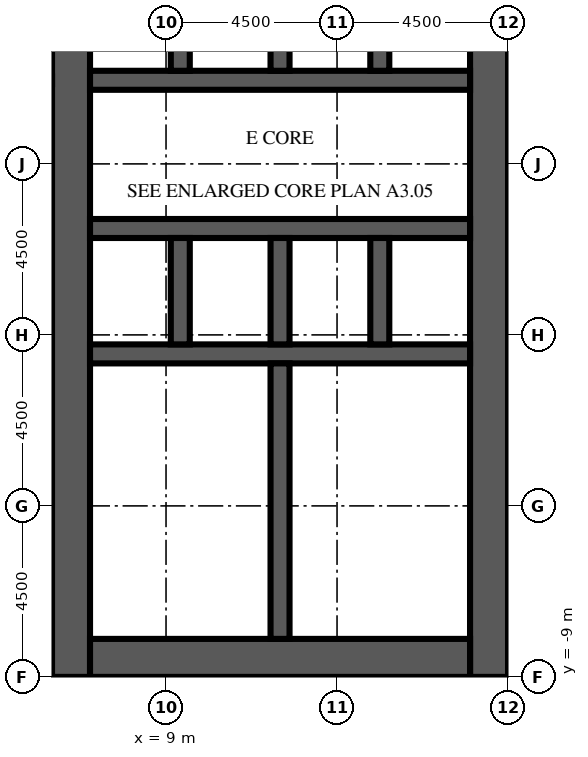
"""IFC4 building model, lengths in metres.
Left out: names, types, materials, properties, quantities, classifications, styles, units other than length and angle.
Written with IfcOpenShell. Run it as: python <this file> out.ifc"""

import sys

from ifc_helpers import new_model, si_unit, direction, frame, frame_2d, origin, place, context, subcontext, project, spatial, rectangle, extrude, element, fill, save


model = new_model("IFC4")
c1 = context("Model", 3, precision=1e-05, world=origin(), true_north=direction((0.0, 1.0)))
c2 = subcontext(c1, "Body", "Model", "MODEL_VIEW")
j1 = project(units=[si_unit("LENGTHUNIT", "METRE"), si_unit("PLANEANGLEUNIT", "RADIAN")], contexts=[c1])
p1 = place(None, origin())
s1 = spatial("IfcSite", under=j1, at=p1, CompositionType="ELEMENT")
p2 = place(p1, origin())
s2 = spatial("IfcBuilding", under=s1, at=p2, CompositionType="ELEMENT")
p3 = place(p2, frame((0.0, 0.0, 27.7)))
s3 = spatial("IfcBuildingStorey", under=s2, at=p3, CompositionType="ELEMENT", Elevation=27.7)
p4 = place(p3, frame((6.5, -9.0, 0.0), z_axis=(0.0, 0.0, 1.0), x_axis=(0.0, 1.0, 0.0)))
e1 = element("IfcWall", 1, at=p4, inside=s3, PredefinedType="SHEAR", context=c2, shape_type="SweptSolid", body=[
    extrude(rectangle(XDim=27.5, YDim=1.0, at=frame_2d((13.75, 0.0))), origin(), (0.0, 0.0, 1.0), 4.1),
])
p5 = place(p4, frame((12.55, 0.0, 0.0)))
e2 = element("IfcOpeningElement", 2, at=p5, cuts=e1, PredefinedType="OPENING", context=c2, shape_type="SweptSolid", body=[
    extrude(rectangle(XDim=2.4, YDim=2.4, at=frame_2d((1.2, 1.2))), frame((0.0, 0.51, 0.0), z_axis=(0.0, -1.0, 0.0), x_axis=(1.0, 0.0, 0.0)), (0.0, 0.0, 1.0), 1.02),
])
p6 = place(p4, frame((3.955, 0.0, 0.0)))
e3 = element("IfcOpeningElement", 3, at=p6, cuts=e1, PredefinedType="OPENING", context=c2, shape_type="SweptSolid", body=[
    extrude(rectangle(XDim=0.905, YDim=2.1, at=frame_2d((0.453, 1.05))), frame((0.0, 0.51, 0.0), z_axis=(0.0, -1.0, 0.0), x_axis=(1.0, 0.0, 0.0)), (0.0, 0.0, 1.0), 1.02),
])
p7 = place(p4, frame((23.363, 0.0, 0.0)))
e4 = element("IfcOpeningElement", 4, at=p7, cuts=e1, PredefinedType="OPENING", context=c2, shape_type="SweptSolid", body=[
    extrude(rectangle(XDim=1.2, YDim=2.1, at=frame_2d((0.6, 1.05))), frame((0.0, 0.51, 0.0), z_axis=(0.0, -1.0, 0.0), x_axis=(1.0, 0.0, 0.0)), (0.0, 0.0, 1.0), 1.02),
])
p8 = place(p3, frame((17.5, -9.0, 0.0), z_axis=(0.0, 0.0, 1.0), x_axis=(0.0, 1.0, 0.0)))
e5 = element("IfcWall", 5, at=p8, inside=s3, PredefinedType="SHEAR", context=c2, shape_type="SweptSolid", body=[
    extrude(rectangle(XDim=27.5, YDim=1.0, at=frame_2d((13.75, 0.0))), origin(), (0.0, 0.0, 1.0), 4.1),
])
p9 = place(p8, frame((12.55, 0.0, 0.0)))
e6 = element("IfcOpeningElement", 6, at=p9, cuts=e5, PredefinedType="OPENING", context=c2, shape_type="SweptSolid", body=[
    extrude(rectangle(XDim=2.4, YDim=2.4, at=frame_2d((1.2, 1.2))), frame((0.0, 0.51, 0.0), z_axis=(0.0, -1.0, 0.0), x_axis=(1.0, 0.0, 0.0)), (0.0, 0.0, 1.0), 1.02),
])
p10 = place(p8, frame((6.825, 0.0, 0.0)))
e7 = element("IfcOpeningElement", 7, at=p10, cuts=e5, PredefinedType="OPENING", context=c2, shape_type="SweptSolid", body=[
    extrude(rectangle(XDim=1.2, YDim=2.1, at=frame_2d((0.6, 1.05))), frame((0.0, 0.51, 0.0), z_axis=(0.0, -1.0, 0.0), x_axis=(1.0, 0.0, 0.0)), (0.0, 0.0, 1.0), 1.02),
])
p11 = place(p8, frame((19.475, 0.0, 0.0)))
e8 = element("IfcOpeningElement", 8, at=p11, cuts=e5, PredefinedType="OPENING", context=c2, shape_type="SweptSolid", body=[
    extrude(rectangle(XDim=1.2, YDim=2.1, at=frame_2d((0.6, 1.05))), frame((0.0, 0.51, 0.0), z_axis=(0.0, -1.0, 0.0), x_axis=(1.0, 0.0, 0.0)), (0.0, 0.0, 1.0), 1.02),
])
p12 = place(p3, frame((7.0, -8.5, 0.0), z_axis=(0.0, 0.0, 1.0), x_axis=(1.0, 0.0, 0.0)))
e9 = element("IfcWall", 9, at=p12, inside=s3, PredefinedType="SHEAR", context=c2, shape_type="SweptSolid", body=[
    extrude(rectangle(XDim=10.0, YDim=1.0, at=frame_2d((5.0, 0.0))), origin(), (0.0, 0.0, 1.0), 4.1),
])
p13 = place(p3, frame((7.0, -0.5, 0.0), z_axis=(0.0, 0.0, 1.0), x_axis=(1.0, 0.0, 0.0)))
e10 = element("IfcWall", 10, at=p13, inside=s3, PredefinedType="SHEAR", context=c2, shape_type="SweptSolid", body=[
    extrude(rectangle(XDim=10.0, YDim=0.5, at=frame_2d((5.0, 0.0))), origin(), (0.0, 0.0, 1.0), 4.1),
])
p14 = place(p3, frame((7.0, 2.8, 0.0), z_axis=(0.0, 0.0, 1.0), x_axis=(1.0, 0.0, 0.0)))
e11 = element("IfcWall", 11, at=p14, inside=s3, PredefinedType="SHEAR", context=c2, shape_type="SweptSolid", body=[
    extrude(rectangle(XDim=10.0, YDim=0.5, at=frame_2d((5.0, 0.0))), origin(), (0.0, 0.0, 1.0), 4.1),
])
p15 = place(p14, frame((0.512, 0.0, 0.0)))
e12 = element("IfcOpeningElement", 12, at=p15, cuts=e11, PredefinedType="OPENING", context=c2, shape_type="SweptSolid", body=[
    extrude(rectangle(XDim=1.1, YDim=2.1, at=frame_2d((0.55, 1.05))), frame((0.0, 0.26, 0.0), z_axis=(0.0, -1.0, 0.0), x_axis=(1.0, 0.0, 0.0)), (0.0, 0.0, 1.0), 0.52),
])
p16 = place(p14, frame((3.137, 0.0, 0.0)))
e13 = element("IfcOpeningElement", 13, at=p16, cuts=e11, PredefinedType="OPENING", context=c2, shape_type="SweptSolid", body=[
    extrude(rectangle(XDim=1.1, YDim=2.1, at=frame_2d((0.55, 1.05))), frame((0.0, 0.26, 0.0), z_axis=(0.0, -1.0, 0.0), x_axis=(1.0, 0.0, 0.0)), (0.0, 0.0, 1.0), 0.52),
])
p17 = place(p14, frame((8.387, 0.0, 0.0)))
e14 = element("IfcOpeningElement", 14, at=p17, cuts=e11, PredefinedType="OPENING", context=c2, shape_type="SweptSolid", body=[
    extrude(rectangle(XDim=1.1, YDim=2.1, at=frame_2d((0.55, 1.05))), frame((0.0, 0.26, 0.0), z_axis=(0.0, -1.0, 0.0), x_axis=(1.0, 0.0, 0.0)), (0.0, 0.0, 1.0), 0.52),
])
p18 = place(p3, frame((7.0, 6.7, 0.0), z_axis=(0.0, 0.0, 1.0), x_axis=(1.0, 0.0, 0.0)))
e15 = element("IfcWall", 15, at=p18, inside=s3, PredefinedType="SHEAR", context=c2, shape_type="SweptSolid", body=[
    extrude(rectangle(XDim=10.0, YDim=0.5, at=frame_2d((5.0, 0.0))), origin(), (0.0, 0.0, 1.0), 4.1),
])
p19 = place(p18, frame((0.512, 0.0, 0.0)))
e16 = element("IfcOpeningElement", 16, at=p19, cuts=e15, PredefinedType="OPENING", context=c2, shape_type="SweptSolid", body=[
    extrude(rectangle(XDim=1.1, YDim=2.1, at=frame_2d((0.55, 1.05))), frame((0.0, 0.26, 0.0), z_axis=(0.0, -1.0, 0.0), x_axis=(1.0, 0.0, 0.0)), (0.0, 0.0, 1.0), 0.52),
])
p20 = place(p18, frame((3.188, 0.0, 0.0)))
e17 = element("IfcOpeningElement", 17, at=p20, cuts=e15, PredefinedType="OPENING", context=c2, shape_type="SweptSolid", body=[
    extrude(rectangle(XDim=1.0, YDim=2.1, at=frame_2d((0.5, 1.05))), frame((0.0, 0.26, 0.0), z_axis=(0.0, -1.0, 0.0), x_axis=(1.0, 0.0, 0.0)), (0.0, 0.0, 1.0), 0.52),
])
p21 = place(p18, frame((5.812, 0.0, 0.0)))
e18 = element("IfcOpeningElement", 18, at=p21, cuts=e15, PredefinedType="OPENING", context=c2, shape_type="SweptSolid", body=[
    extrude(rectangle(XDim=1.0, YDim=2.1, at=frame_2d((0.5, 1.05))), frame((0.0, 0.26, 0.0), z_axis=(0.0, -1.0, 0.0), x_axis=(1.0, 0.0, 0.0)), (0.0, 0.0, 1.0), 0.52),
])
p22 = place(p18, frame((8.438, 0.0, 0.0)))
e19 = element("IfcOpeningElement", 19, at=p22, cuts=e15, PredefinedType="OPENING", context=c2, shape_type="SweptSolid", body=[
    extrude(rectangle(XDim=1.0, YDim=2.1, at=frame_2d((0.5, 1.05))), frame((0.0, 0.26, 0.0), z_axis=(0.0, -1.0, 0.0), x_axis=(1.0, 0.0, 0.0)), (0.0, 0.0, 1.0), 0.52),
])
for number, where, z_axis, x_axis in (
    (20, (9.375, -0.25, 0.0), (0.0, 0.0, 1.0), (0.0, 1.0, 0.0)),
    (21, (9.375, 6.95, 0.0), (0.0, 0.0, 1.0), (0.0, 1.0, 0.0)),
    (22, (12.0, -0.25, 0.0), (0.0, 0.0, 1.0), (0.0, 1.0, 0.0)),
    (23, (12.0, 6.95, 0.0), (0.0, 0.0, 1.0), (0.0, 1.0, 0.0)),
    (24, (14.625, -0.25, 0.0), (0.0, 0.0, 1.0), (0.0, 1.0, 0.0)),
    (25, (14.625, 6.95, 0.0), (0.0, 0.0, 1.0), (0.0, 1.0, 0.0)),
):
    element("IfcWall", number, at=place(p3, frame(where, z_axis=z_axis, x_axis=x_axis)), inside=s3, PredefinedType="SHEAR", context=c2, shape_type="SweptSolid", body=[
        extrude(rectangle(XDim=2.8, YDim=0.5, at=frame_2d((1.4, 0.0))), origin(), (0.0, 0.0, 1.0), 4.1),
    ])
p23 = place(p3, frame((12.0, -8.0, 0.0), z_axis=(0.0, 0.0, 1.0), x_axis=(0.0, 1.0, 0.0)))
e26 = element("IfcWall", 26, at=p23, inside=s3, PredefinedType="SHEAR", context=c2, shape_type="SweptSolid", body=[
    extrude(rectangle(XDim=7.25, YDim=0.5, at=frame_2d((3.625, 0.0))), origin(), (0.0, 0.0, 1.0), 4.1),
])
p24 = place(p3, frame((7.0, -5.245, 0.0), z_axis=(0.0, 0.0, 1.0), x_axis=(1.0, 0.0, 0.0)))
e27 = element("IfcWall", 27, at=p24, inside=s3, PredefinedType="PARTITIONING", context=c2, shape_type="SweptSolid", body=[
    extrude(rectangle(XDim=4.75, YDim=0.1, at=frame_2d((2.375, 0.0))), origin(), (0.0, 0.0, 1.0), 3.65),
])
p25 = place(p24, frame((1.875, 0.0, 0.0)))
e28 = element("IfcOpeningElement", 28, at=p25, cuts=e27, PredefinedType="OPENING", context=c2, shape_type="SweptSolid", body=[
    extrude(rectangle(XDim=1.0, YDim=2.1, at=frame_2d((0.5, 1.05))), frame((0.0, 0.06, 0.0), z_axis=(0.0, -1.0, 0.0), x_axis=(1.0, 0.0, 0.0)), (0.0, 0.0, 1.0), 0.12),
])
p26 = place(p3, frame((7.0, -3.94, 0.0), z_axis=(0.0, 0.0, 1.0), x_axis=(1.0, 0.0, 0.0)))
e29 = element("IfcWall", 29, at=p26, inside=s3, PredefinedType="PARTITIONING", context=c2, shape_type="SweptSolid", body=[
    extrude(rectangle(XDim=2.945, YDim=0.1, at=frame_2d((1.473, 0.0))), origin(), (0.0, 0.0, 1.0), 3.65),
])
p27 = place(p26, frame((0.972, 0.0, 0.0)))
e30 = element("IfcOpeningElement", 30, at=p27, cuts=e29, PredefinedType="OPENING", context=c2, shape_type="SweptSolid", body=[
    extrude(rectangle(XDim=1.0, YDim=2.1, at=frame_2d((0.5, 1.05))), frame((0.0, 0.06, 0.0), z_axis=(0.0, -1.0, 0.0), x_axis=(1.0, 0.0, 0.0)), (0.0, 0.0, 1.0), 0.12),
])
p28 = place(p3, frame((9.945, -3.94, 0.0), z_axis=(0.0, 0.0, 1.0), x_axis=(1.0, 0.0, 0.0)))
e31 = element("IfcWall", 31, at=p28, inside=s3, PredefinedType="PARTITIONING", context=c2, shape_type="SweptSolid", body=[
    extrude(rectangle(XDim=1.805, YDim=0.1, at=frame_2d((0.902, 0.0))), origin(), (0.0, 0.0, 1.0), 3.65),
])
p29 = place(p28, frame((0.403, 0.0, 0.0)))
e32 = element("IfcOpeningElement", 32, at=p29, cuts=e31, PredefinedType="OPENING", context=c2, shape_type="SweptSolid", body=[
    extrude(rectangle(XDim=1.0, YDim=2.1, at=frame_2d((0.5, 1.05))), frame((0.0, 0.06, 0.0), z_axis=(0.0, -1.0, 0.0), x_axis=(1.0, 0.0, 0.0)), (0.0, 0.0, 1.0), 0.12),
])
p30 = place(p3, frame((9.945, -3.94, 0.0), z_axis=(0.0, 0.0, 1.0), x_axis=(0.0, 1.0, 0.0)))
e33 = element("IfcWall", 33, at=p30, inside=s3, PredefinedType="PARTITIONING", context=c2, shape_type="SweptSolid", body=[
    extrude(rectangle(XDim=3.19, YDim=0.1, at=frame_2d((1.595, 0.0))), origin(), (0.0, 0.0, 1.0), 3.65),
])
p31 = place(p15, origin())
e34 = element("IfcDoor", 34, at=p31, inside=s3, OperationType="DOUBLE_DOOR_SLIDING", PredefinedType="DOOR", context=c2, shape_type="SweptSolid", body=[
    extrude(rectangle(XDim=1.1, YDim=2.1, at=frame_2d((0.55, 1.05))), frame((0.0, 0.025, 0.0), z_axis=(0.0, -1.0, 0.0), x_axis=(1.0, 0.0, 0.0)), (0.0, 0.0, 1.0), 0.05),
])
fill(e12, e34)
p32 = place(p16, origin())
e35 = element("IfcDoor", 35, at=p32, inside=s3, OperationType="DOUBLE_DOOR_SLIDING", PredefinedType="DOOR", context=c2, shape_type="SweptSolid", body=[
    extrude(rectangle(XDim=1.1, YDim=2.1, at=frame_2d((0.55, 1.05))), frame((0.0, 0.025, 0.0), z_axis=(0.0, -1.0, 0.0), x_axis=(1.0, 0.0, 0.0)), (0.0, 0.0, 1.0), 0.05),
])
fill(e13, e35)
p33 = place(p17, origin())
e36 = element("IfcDoor", 36, at=p33, inside=s3, OperationType="DOUBLE_DOOR_SLIDING", PredefinedType="DOOR", context=c2, shape_type="SweptSolid", body=[
    extrude(rectangle(XDim=1.1, YDim=2.1, at=frame_2d((0.55, 1.05))), frame((0.0, 0.025, 0.0), z_axis=(0.0, -1.0, 0.0), x_axis=(1.0, 0.0, 0.0)), (0.0, 0.0, 1.0), 0.05),
])
fill(e14, e36)
p34 = place(p19, origin())
e37 = element("IfcDoor", 37, at=p34, inside=s3, OperationType="DOUBLE_DOOR_SLIDING", PredefinedType="DOOR", context=c2, shape_type="SweptSolid", body=[
    extrude(rectangle(XDim=1.1, YDim=2.1, at=frame_2d((0.55, 1.05))), frame((0.0, 0.025, 0.0), z_axis=(0.0, -1.0, 0.0), x_axis=(1.0, 0.0, 0.0)), (0.0, 0.0, 1.0), 0.05),
])
fill(e16, e37)
p35 = place(p5, origin())
e38 = element("IfcDoor", 38, at=p35, inside=s3, OperationType="DOUBLE_DOOR_DOUBLE_SWING", PredefinedType="DOOR", context=c2, shape_type="SweptSolid", body=[
    extrude(rectangle(XDim=2.4, YDim=2.4, at=frame_2d((1.2, 1.2))), frame((0.0, 0.025, 0.0), z_axis=(0.0, -1.0, 0.0), x_axis=(1.0, 0.0, 0.0)), (0.0, 0.0, 1.0), 0.05),
])
fill(e2, e38)
p36 = place(p9, origin())
e39 = element("IfcDoor", 39, at=p36, inside=s3, OperationType="DOUBLE_DOOR_DOUBLE_SWING", PredefinedType="DOOR", context=c2, shape_type="SweptSolid", body=[
    extrude(rectangle(XDim=2.4, YDim=2.4, at=frame_2d((1.2, 1.2))), frame((0.0, 0.025, 0.0), z_axis=(0.0, -1.0, 0.0), x_axis=(1.0, 0.0, 0.0)), (0.0, 0.0, 1.0), 0.05),
])
fill(e6, e39)
p37 = place(p10, frame((1.2, 0.0, 0.0), z_axis=(0.0, 0.0, 1.0), x_axis=(-1.0, 0.0, 0.0)))
e40 = element("IfcDoor", 40, at=p37, inside=s3, OperationType="SINGLE_SWING_LEFT", PredefinedType="DOOR", context=c2, shape_type="SweptSolid", body=[
    extrude(rectangle(XDim=1.2, YDim=2.1, at=frame_2d((0.6, 1.05))), frame((0.0, 0.025, 0.0), z_axis=(0.0, -1.0, 0.0), x_axis=(1.0, 0.0, 0.0)), (0.0, 0.0, 1.0), 0.05),
])
fill(e7, e40)
p38 = place(p20, origin())
e41 = element("IfcDoor", 41, at=p38, inside=s3, OperationType="SINGLE_SWING_RIGHT", PredefinedType="DOOR", context=c2, shape_type="SweptSolid", body=[
    extrude(rectangle(XDim=1.0, YDim=2.1, at=frame_2d((0.5, 1.05))), frame((0.0, 0.025, 0.0), z_axis=(0.0, -1.0, 0.0), x_axis=(1.0, 0.0, 0.0)), (0.0, 0.0, 1.0), 0.05),
])
fill(e17, e41)
p39 = place(p21, origin())
e42 = element("IfcDoor", 42, at=p39, inside=s3, OperationType="SINGLE_SWING_LEFT", PredefinedType="DOOR", context=c2, shape_type="SweptSolid", body=[
    extrude(rectangle(XDim=1.0, YDim=2.1, at=frame_2d((0.5, 1.05))), frame((0.0, 0.025, 0.0), z_axis=(0.0, -1.0, 0.0), x_axis=(1.0, 0.0, 0.0)), (0.0, 0.0, 1.0), 0.05),
])
fill(e18, e42)
p40 = place(p22, origin())
e43 = element("IfcDoor", 43, at=p40, inside=s3, OperationType="SINGLE_SWING_RIGHT", PredefinedType="DOOR", context=c2, shape_type="SweptSolid", body=[
    extrude(rectangle(XDim=1.0, YDim=2.1, at=frame_2d((0.5, 1.05))), frame((0.0, 0.025, 0.0), z_axis=(0.0, -1.0, 0.0), x_axis=(1.0, 0.0, 0.0)), (0.0, 0.0, 1.0), 0.05),
])
fill(e19, e43)
p41 = place(p6, origin())
e44 = element("IfcDoor", 44, at=p41, inside=s3, OperationType="SINGLE_SWING_RIGHT", PredefinedType="DOOR", context=c2, shape_type="SweptSolid", body=[
    extrude(rectangle(XDim=0.905, YDim=2.1, at=frame_2d((0.453, 1.05))), frame((0.0, -0.425, 0.0), z_axis=(0.0, -1.0, 0.0), x_axis=(1.0, 0.0, 0.0)), (0.0, 0.0, 1.0), 0.05),
])
fill(e3, e44)
p42 = place(p25, origin())
e45 = element("IfcDoor", 45, at=p42, inside=s3, OperationType="SINGLE_SWING_LEFT", PredefinedType="DOOR", context=c2, shape_type="SweptSolid", body=[
    extrude(rectangle(XDim=1.0, YDim=2.1, at=frame_2d((0.5, 1.05))), frame((0.0, 0.025, 0.0), z_axis=(0.0, -1.0, 0.0), x_axis=(1.0, 0.0, 0.0)), (0.0, 0.0, 1.0), 0.05),
])
fill(e28, e45)
p43 = place(p27, origin())
e46 = element("IfcDoor", 46, at=p43, inside=s3, OperationType="SINGLE_SWING_RIGHT", PredefinedType="DOOR", context=c2, shape_type="SweptSolid", body=[
    extrude(rectangle(XDim=1.0, YDim=2.1, at=frame_2d((0.5, 1.05))), frame((0.0, 0.025, 0.0), z_axis=(0.0, -1.0, 0.0), x_axis=(1.0, 0.0, 0.0)), (0.0, 0.0, 1.0), 0.05),
])
fill(e30, e46)
p44 = place(p29, origin())
e47 = element("IfcDoor", 47, at=p44, inside=s3, OperationType="SINGLE_SWING_LEFT", PredefinedType="DOOR", context=c2, shape_type="SweptSolid", body=[
    extrude(rectangle(XDim=1.0, YDim=2.1, at=frame_2d((0.5, 1.05))), frame((0.0, 0.025, 0.0), z_axis=(0.0, -1.0, 0.0), x_axis=(1.0, 0.0, 0.0)), (0.0, 0.0, 1.0), 0.05),
])
fill(e32, e47)
save(model, sys.argv[1])
